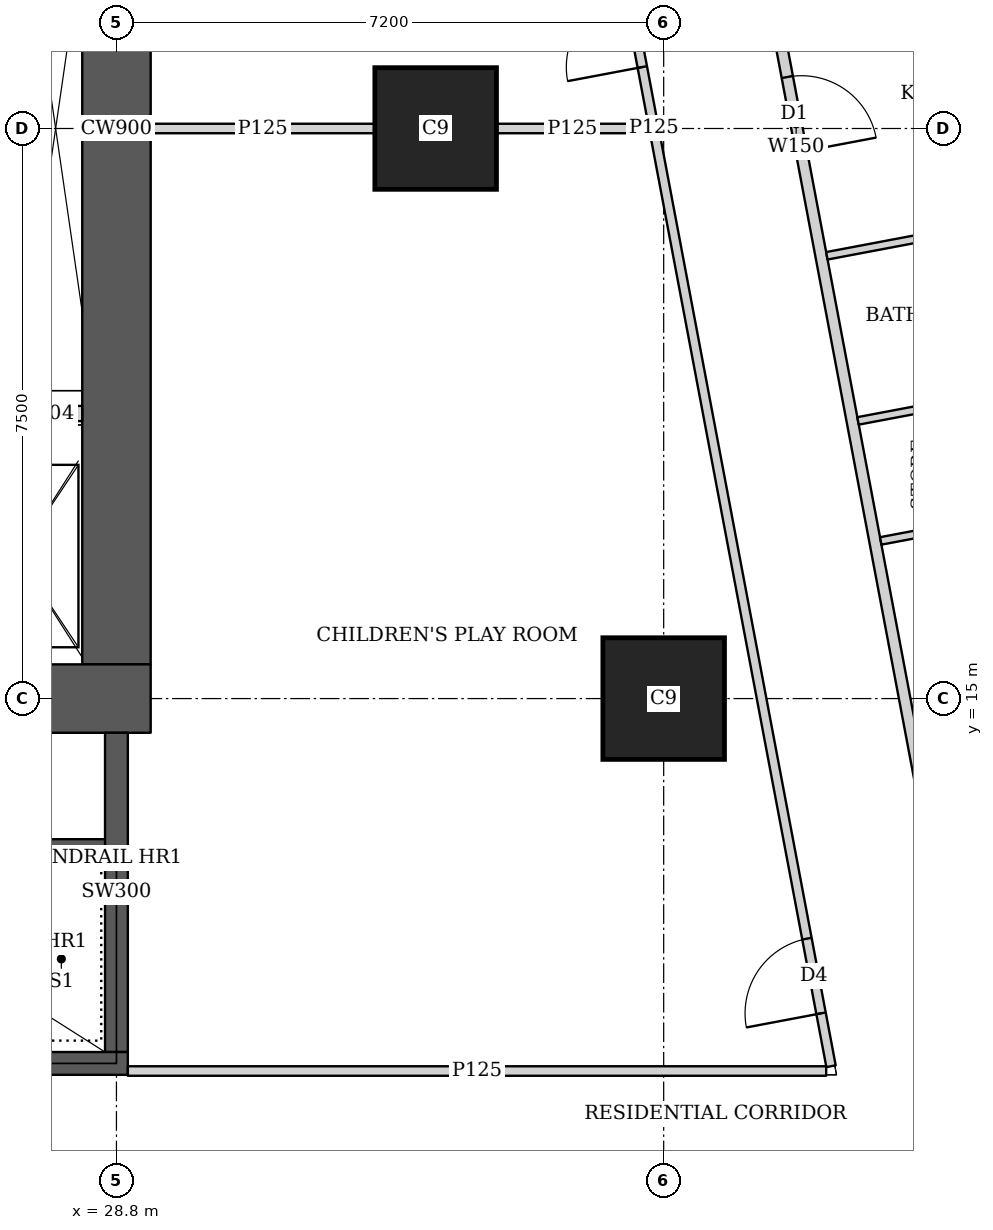
"""IFC4 building model, lengths in metres.
Left out: names, types, materials, properties, quantities, classifications, styles, units other than length and angle.
Written with IfcOpenShell. Run it as: python <this file> out.ifc"""

import sys

from ifc_helpers import new_model, si_unit, direction, frame, frame_2d, origin, origin_2d, place, context, subcontext, project, spatial, rectangle, extrude, element, fill, save


model = new_model("IFC4")
c1 = context("Model", 3, precision=1e-05, world=origin(), true_north=direction((0.0, 1.0)))
c2 = subcontext(c1, "Body", "Model", "MODEL_VIEW")
j1 = project(units=[si_unit("LENGTHUNIT", "METRE"), si_unit("PLANEANGLEUNIT", "RADIAN")], contexts=[c1])
p1 = place(None, origin())
s1 = spatial("IfcSite", under=j1, at=p1, CompositionType="ELEMENT")
p2 = place(p1, origin())
s2 = spatial("IfcBuilding", under=s1, at=p2, CompositionType="ELEMENT")
p3 = place(p2, frame((0.0, 0.0, 126.65)))
s3 = spatial("IfcBuildingStorey", under=s2, at=p3, CompositionType="ELEMENT", Elevation=126.65)
for number, where, z_axis, x_axis in (
    (1, (36.0, 15.0, 0.0), (0.0, 0.0, 1.0), (1.0, 0.0, 0.0)),
    (2, (33.0, 22.5, 0.0), (0.0, 0.0, 1.0), (1.0, 0.0, 0.0)),
):
    element("IfcColumn", number, at=place(p3, frame(where, z_axis=z_axis, x_axis=x_axis)), inside=s3, PredefinedType="COLUMN", context=c2, shape_type="SweptSolid", body=[
        extrude(rectangle(XDim=1.6, YDim=1.6, at=origin_2d()), origin(), (0.0, 0.0, 1.0), 3.75),
    ])
p4 = place(p3, frame((13.95, 15.0, 0.0), z_axis=(0.0, 0.0, 1.0), x_axis=(1.0, 0.0, 0.0)))
e3 = element("IfcWall", 3, at=p4, inside=s3, PredefinedType="SHEAR", context=c2, shape_type="SweptSolid", body=[
    extrude(rectangle(XDim=15.3, YDim=0.9, at=frame_2d((7.65, 0.0))), origin(), (0.0, 0.0, 1.0), 3.75),
])
p5 = place(p4, frame((4.45, 0.0, 0.0)))
e4 = element("IfcOpeningElement", 4, at=p5, cuts=e3, PredefinedType="OPENING", context=c2, shape_type="SweptSolid", body=[
    extrude(rectangle(XDim=1.8, YDim=2.1, at=frame_2d((0.9, 1.05))), frame((0.0, 0.46, 0.0), z_axis=(0.0, -1.0, 0.0), x_axis=(1.0, 0.0, 0.0)), (0.0, 0.0, 1.0), 0.92),
])
p6 = place(p4, frame((10.7, 0.0, 0.0)))
e5 = element("IfcOpeningElement", 5, at=p6, cuts=e3, PredefinedType="OPENING", context=c2, shape_type="SweptSolid", body=[
    extrude(rectangle(XDim=1.1, YDim=2.1, at=frame_2d((0.55, 1.05))), frame((0.0, 0.46, 0.0), z_axis=(0.0, -1.0, 0.0), x_axis=(1.0, 0.0, 0.0)), (0.0, 0.0, 1.0), 0.92),
])
p7 = place(p3, frame((28.8, 15.45, 0.0), z_axis=(0.0, 0.0, 1.0), x_axis=(0.0, 1.0, 0.0)))
e6 = element("IfcWall", 6, at=p7, inside=s3, PredefinedType="SHEAR", context=c2, shape_type="SweptSolid", body=[
    extrude(rectangle(XDim=14.1, YDim=0.9, at=frame_2d((7.05, 0.0))), origin(), (0.0, 0.0, 1.0), 3.75),
])
p8 = place(p3, frame((21.45, 10.2, 0.0), z_axis=(0.0, 0.0, 1.0), x_axis=(1.0, 0.0, 0.0)))
e7 = element("IfcWall", 7, at=p8, inside=s3, PredefinedType="SHEAR", context=c2, shape_type="SweptSolid", body=[
    extrude(rectangle(XDim=7.5, YDim=0.3, at=frame_2d((3.75, 0.0))), origin(), (0.0, 0.0, 1.0), 3.75),
])
p9 = place(p8, frame((0.5, 0.0, 0.0)))
e8 = element("IfcOpeningElement", 8, at=p9, cuts=e7, PredefinedType="OPENING", context=c2, shape_type="SweptSolid", body=[
    extrude(rectangle(XDim=1.1, YDim=2.1, at=frame_2d((0.55, 1.05))), frame((0.0, 0.16, 0.0), z_axis=(0.0, -1.0, 0.0), x_axis=(1.0, 0.0, 0.0)), (0.0, 0.0, 1.0), 0.32),
])
p10 = place(p3, frame((28.8, 10.35, 0.0), z_axis=(0.0, 0.0, 1.0), x_axis=(0.0, 1.0, 0.0)))
e9 = element("IfcWall", 9, at=p10, inside=s3, PredefinedType="SHEAR", context=c2, shape_type="SweptSolid", body=[
    extrude(rectangle(XDim=4.2, YDim=0.3, at=frame_2d((2.1, 0.0))), origin(), (0.0, 0.0, 1.0), 3.75),
])
p11 = place(p3, frame((33.896, 42.929, 0.0), z_axis=(0.0, 0.0, 1.0), x_axis=(0.1855961604, -0.982626106535, 0.0)))
e10 = element("IfcWall", 10, at=p11, inside=s3, PredefinedType="SOLIDWALL", context=c2, shape_type="SweptSolid", body=[
    extrude(rectangle(XDim=41.456, YDim=0.15, at=frame_2d((20.728, 0.0))), origin(), (0.0, 0.0, 1.0), 2.45),
])
p12 = place(p11, frame((7.893, 0.0, 0.0)))
e11 = element("IfcOpeningElement", 11, at=p12, cuts=e10, PredefinedType="OPENING", context=c2, shape_type="SweptSolid", body=[
    extrude(rectangle(XDim=1.0, YDim=2.1, at=frame_2d((0.5, 1.05))), frame((0.0, 0.085, 0.0), z_axis=(0.0, -1.0, 0.0), x_axis=(1.0, 0.0, 0.0)), (0.0, 0.0, 1.0), 0.17),
])
p13 = place(p11, frame((12.468, 0.0, 0.0)))
e12 = element("IfcOpeningElement", 12, at=p13, cuts=e10, PredefinedType="OPENING", context=c2, shape_type="SweptSolid", body=[
    extrude(rectangle(XDim=1.0, YDim=2.1, at=frame_2d((0.5, 1.05))), frame((0.0, 0.085, 0.0), z_axis=(0.0, -1.0, 0.0), x_axis=(1.0, 0.0, 0.0)), (0.0, 0.0, 1.0), 0.17),
])
p14 = place(p11, frame((20.101, 0.0, 0.0)))
e13 = element("IfcOpeningElement", 13, at=p14, cuts=e10, PredefinedType="OPENING", context=c2, shape_type="SweptSolid", body=[
    extrude(rectangle(XDim=1.0, YDim=2.1, at=frame_2d((0.5, 1.05))), frame((0.0, 0.085, 0.0), z_axis=(0.0, -1.0, 0.0), x_axis=(1.0, 0.0, 0.0)), (0.0, 0.0, 1.0), 0.17),
])
p15 = place(p11, frame((31.064, 0.0, 0.0)))
e14 = element("IfcOpeningElement", 14, at=p15, cuts=e10, PredefinedType="OPENING", context=c2, shape_type="SweptSolid", body=[
    extrude(rectangle(XDim=1.0, YDim=2.1, at=frame_2d((0.5, 1.05))), frame((0.0, 0.085, 0.0), z_axis=(0.0, -1.0, 0.0), x_axis=(1.0, 0.0, 0.0)), (0.0, 0.0, 1.0), 0.17),
])
p16 = place(p3, frame((41.365, 21.433, 0.0), z_axis=(0.0, 0.0, 1.0), x_axis=(-0.982607026909, -0.185697147715, 0.0)))
e15 = element("IfcWall", 15, at=p16, inside=s3, PredefinedType="PARTITIONING", context=c2, shape_type="SweptSolid", body=[
    extrude(rectangle(XDim=3.275, YDim=0.1, at=frame_2d((1.637, 0.0))), origin(), (0.0, 0.0, 1.0), 3.45),
])
p17 = place(p3, frame((42.073, 17.682, 0.0), z_axis=(0.0, 0.0, 1.0), x_axis=(-0.982610347627, -0.185679575441, 0.0)))
e16 = element("IfcWall", 16, at=p17, inside=s3, PredefinedType="PARTITIONING", context=c2, shape_type="SweptSolid", body=[
    extrude(rectangle(XDim=3.274, YDim=0.1, at=frame_2d((1.637, 0.0))), origin(), (0.0, 0.0, 1.0), 3.45),
])
p18 = place(p17, frame((1.2, 0.0, 0.0)))
e17 = element("IfcOpeningElement", 17, at=p18, cuts=e16, PredefinedType="OPENING", context=c2, shape_type="SweptSolid", body=[
    extrude(rectangle(XDim=0.9, YDim=2.1, at=frame_2d((0.45, 1.05))), frame((0.0, 0.06, 0.0), z_axis=(0.0, -1.0, 0.0), x_axis=(1.0, 0.0, 0.0)), (0.0, 0.0, 1.0), 0.12),
])
p19 = place(p3, frame((41.775, 19.261, 0.0), z_axis=(0.0, 0.0, 1.0), x_axis=(-0.982620626894, -0.185625169636, 0.0)))
e18 = element("IfcWall", 18, at=p19, inside=s3, PredefinedType="PARTITIONING", context=c2, shape_type="SweptSolid", body=[
    extrude(rectangle(XDim=3.275, YDim=0.1, at=frame_2d((1.637, 0.0))), origin(), (0.0, 0.0, 1.0), 3.45),
])
p20 = place(p3, frame((28.95, 10.1, 0.0), z_axis=(0.0, 0.0, 1.0), x_axis=(1.0, 0.0, 0.0)))
e19 = element("IfcWall", 19, at=p20, inside=s3, PredefinedType="PARTITIONING", context=c2, shape_type="SweptSolid", body=[
    extrude(rectangle(XDim=9.188, YDim=0.125, at=frame_2d((4.594, 0.0))), origin(), (0.0, 0.0, 1.0), 3.45),
])
p21 = place(p3, frame((38.202, 10.163, 0.0), z_axis=(0.0, 0.0, 1.0), x_axis=(-0.185610321132, 0.982623431783, 0.0)))
e20 = element("IfcWall", 20, at=p21, inside=s3, PredefinedType="PARTITIONING", context=c2, shape_type="SweptSolid", body=[
    extrude(rectangle(XDim=25.111, YDim=0.125, at=frame_2d((12.556, 0.0))), origin(), (0.0, 0.0, 1.0), 2.45),
])
p22 = place(p21, frame((0.708, 0.0, 0.0)))
e21 = element("IfcOpeningElement", 21, at=p22, cuts=e20, PredefinedType="OPENING", context=c2, shape_type="SweptSolid", body=[
    extrude(rectangle(XDim=1.0, YDim=2.1, at=frame_2d((0.5, 1.05))), frame((0.0, 0.073, 0.0), z_axis=(0.0, -1.0, 0.0), x_axis=(1.0, 0.0, 0.0)), (0.0, 0.0, 1.0), 0.145),
])
p23 = place(p21, frame((13.378, 0.0, 0.0)))
e22 = element("IfcOpeningElement", 22, at=p23, cuts=e20, PredefinedType="OPENING", context=c2, shape_type="SweptSolid", body=[
    extrude(rectangle(XDim=1.0, YDim=2.1, at=frame_2d((0.5, 1.05))), frame((0.0, 0.073, 0.0), z_axis=(0.0, -1.0, 0.0), x_axis=(1.0, 0.0, 0.0)), (0.0, 0.0, 1.0), 0.145),
])
p24 = place(p21, frame((21.25, 0.0, 0.0)))
e23 = element("IfcOpeningElement", 23, at=p24, cuts=e20, PredefinedType="OPENING", context=c2, shape_type="SweptSolid", body=[
    extrude(rectangle(XDim=1.0, YDim=2.1, at=frame_2d((0.5, 1.05))), frame((0.0, 0.073, 0.0), z_axis=(0.0, -1.0, 0.0), x_axis=(1.0, 0.0, 0.0)), (0.0, 0.0, 1.0), 0.145),
])
p25 = place(p21, frame((23.453, 0.0, 0.0)))
e24 = element("IfcOpeningElement", 24, at=p25, cuts=e20, PredefinedType="OPENING", context=c2, shape_type="SweptSolid", body=[
    extrude(rectangle(XDim=1.0, YDim=2.1, at=frame_2d((0.5, 1.05))), frame((0.0, 0.073, 0.0), z_axis=(0.0, -1.0, 0.0), x_axis=(1.0, 0.0, 0.0)), (0.0, 0.0, 1.0), 0.145),
])
p26 = place(p3, frame((29.25, 22.5, 0.0), z_axis=(0.0, 0.0, 1.0), x_axis=(1.0, 0.0, 0.0)))
e25 = element("IfcWall", 25, at=p26, inside=s3, PredefinedType="PARTITIONING", context=c2, shape_type="SweptSolid", body=[
    extrude(rectangle(XDim=2.949, YDim=0.125, at=frame_2d((1.475, 0.0))), origin(), (0.0, 0.0, 1.0), 3.45),
])
p27 = place(p3, frame((33.801, 22.5, 0.0), z_axis=(0.0, 0.0, 1.0), x_axis=(1.0, 0.0, 0.0)))
e26 = element("IfcWall", 26, at=p27, inside=s3, PredefinedType="PARTITIONING", context=c2, shape_type="SweptSolid", body=[
    extrude(rectangle(XDim=1.995, YDim=0.125, at=frame_2d((0.998, 0.0))), origin(), (0.0, 0.0, 1.0), 2.45),
])
p28 = place(p3, frame((23.0, 13.05, 0.0), z_axis=(0.0, 0.0, 1.0), x_axis=(1.0, 0.0, 0.0)))
e27 = element("IfcWall", 27, at=p28, inside=s3, PredefinedType="SHEAR", context=c2, shape_type="SweptSolid", body=[
    extrude(rectangle(XDim=5.8, YDim=0.2, at=frame_2d((2.9, 0.0))), origin(), (0.0, 0.0, 1.0), 3.75),
])
p29 = place(p3, frame((27.4, 18.75, 0.0), z_axis=(0.0, 0.0, 1.0), x_axis=(1.0, 0.0, 0.0)))
e28 = element("IfcWall", 28, at=p29, inside=s3, PredefinedType="SOLIDWALL", context=c2, shape_type="SweptSolid", body=[
    extrude(rectangle(XDim=0.95, YDim=0.2, at=frame_2d((0.475, 0.0))), origin(), (0.0, 0.0, 1.0), 3.45),
])
p30 = place(p14, origin())
e29 = element("IfcDoor", 29, at=p30, inside=s3, OperationType="SINGLE_SWING_RIGHT", PredefinedType="DOOR", context=c2, shape_type="SweptSolid", body=[
    extrude(rectangle(XDim=1.0, YDim=2.1, at=frame_2d((0.5, 1.05))), frame((0.0, 0.025, 0.0), z_axis=(0.0, -1.0, 0.0), x_axis=(1.0, 0.0, 0.0)), (0.0, 0.0, 1.0), 0.05),
])
fill(e13, e29)
p31 = place(p22, origin())
e30 = element("IfcDoor", 30, at=p31, inside=s3, OperationType="SINGLE_SWING_LEFT", PredefinedType="DOOR", context=c2, shape_type="SweptSolid", body=[
    extrude(rectangle(XDim=1.0, YDim=2.1, at=frame_2d((0.5, 1.05))), frame((0.0, 0.025, 0.0), z_axis=(0.0, -1.0, 0.0), x_axis=(1.0, 0.0, 0.0)), (0.0, 0.0, 1.0), 0.05),
])
fill(e21, e30)
p32 = place(p23, origin())
e31 = element("IfcDoor", 31, at=p32, inside=s3, OperationType="SINGLE_SWING_LEFT", PredefinedType="DOOR", context=c2, shape_type="SweptSolid", body=[
    extrude(rectangle(XDim=1.0, YDim=2.1, at=frame_2d((0.5, 1.05))), frame((0.0, 0.025, 0.0), z_axis=(0.0, -1.0, 0.0), x_axis=(1.0, 0.0, 0.0)), (0.0, 0.0, 1.0), 0.05),
])
fill(e22, e31)
save(model, sys.argv[1])
